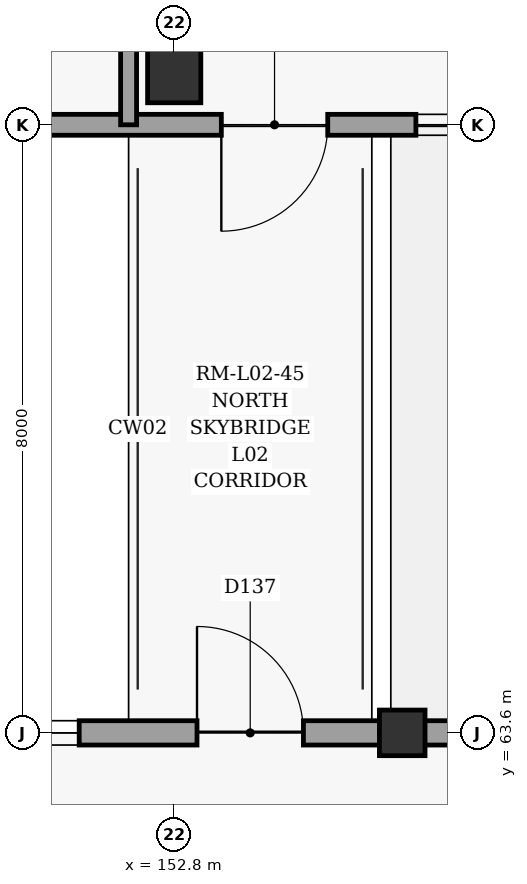
"""IFC4 building model, lengths in metres.
Left out: names, types, materials, properties, quantities, classifications, styles, units other than length and angle.
Written with IfcOpenShell. Run it as: python <this file> out.ifc"""

import sys

from ifc_helpers import new_model, si_unit, direction, frame, frame_2d, origin, origin_2d, place, context, subcontext, project, spatial, rectangle, extrude, element, fill, save


model = new_model("IFC4")
c1 = context("Model", 3, precision=1e-05, world=origin(), true_north=direction((0.0, 1.0)))
c2 = subcontext(c1, "Body", "Model", "MODEL_VIEW")
j1 = project(units=[si_unit("LENGTHUNIT", "METRE"), si_unit("PLANEANGLEUNIT", "RADIAN")], contexts=[c1])
p1 = place(None, origin())
s1 = spatial("IfcSite", under=j1, at=p1, CompositionType="ELEMENT")
p2 = place(p1, origin())
s2 = spatial("IfcBuilding", under=s1, at=p2, CompositionType="ELEMENT")
p3 = place(p2, frame((0.0, 0.0, 10.2)))
s3 = spatial("IfcBuildingStorey", under=s2, at=p3, CompositionType="ELEMENT", Elevation=10.2)
p4 = place(p3, frame((155.8, 63.6, 0.0), z_axis=(0.0, 0.0, 1.0), x_axis=(1.0, 0.0, 0.0)))
e1 = element("IfcColumn", 1, at=p4, inside=s3, PredefinedType="COLUMN", context=c2, shape_type="SweptSolid", body=[
    extrude(rectangle(XDim=0.6, YDim=0.6, at=origin_2d()), origin(), (0.0, 0.0, 1.0), 5.4),
])
p5 = place(p3, frame((152.8, 72.24, 0.0), z_axis=(0.0, 0.0, 1.0), x_axis=(1.0, 0.0, 0.0)))
e2 = element("IfcColumn", 2, at=p5, inside=s3, PredefinedType="COLUMN", context=c2, shape_type="SweptSolid", body=[
    extrude(rectangle(XDim=0.7, YDim=0.7, at=origin_2d()), origin(), (0.0, 0.0, 1.0), 5.4),
])
p6 = place(p3, frame((149.2, 63.6, 0.0), z_axis=(0.0, 0.0, 1.0), x_axis=(1.0, 0.0, 0.0)))
e3 = element("IfcWall", 3, at=p6, inside=s3, PredefinedType="SOLIDWALL", context=c2, shape_type="SweptSolid", body=[
    extrude(rectangle(XDim=22.8, YDim=0.32, at=frame_2d((11.4, 0.0))), origin(), (0.0, 0.0, 1.0), 4.3),
])
p7 = place(p6, frame((0.75, 0.0, 0.9)))
e4 = element("IfcOpeningElement", 4, at=p7, cuts=e3, PredefinedType="OPENING", context=c2, shape_type="SweptSolid", body=[
    extrude(rectangle(XDim=1.6, YDim=1.65, at=frame_2d((0.8, 0.825))), frame((0.0, 0.17, 0.0), z_axis=(0.0, -1.0, 0.0), x_axis=(1.0, 0.0, 0.0)), (0.0, 0.0, 1.0), 0.34),
])
p8 = place(p6, frame((8.6, 0.0, 0.9)))
e5 = element("IfcOpeningElement", 5, at=p8, cuts=e3, PredefinedType="OPENING", context=c2, shape_type="SweptSolid", body=[
    extrude(rectangle(XDim=2.8, YDim=2.4, at=frame_2d((1.4, 1.2))), frame((0.0, 0.17, 0.0), z_axis=(0.0, -1.0, 0.0), x_axis=(1.0, 0.0, 0.0)), (0.0, 0.0, 1.0), 0.34),
])
p9 = place(p6, frame((3.9, 0.0, 0.0)))
e6 = element("IfcOpeningElement", 6, at=p9, cuts=e3, PredefinedType="OPENING", context=c2, shape_type="SweptSolid", body=[
    extrude(rectangle(XDim=1.4, YDim=2.25, at=frame_2d((0.7, 1.125))), frame((0.0, 0.17, 0.0), z_axis=(0.0, -1.0, 0.0), x_axis=(1.0, 0.0, 0.0)), (0.0, 0.0, 1.0), 0.34),
])
p10 = place(p3, frame((172.0, 71.6, 0.0), z_axis=(0.0, 0.0, 1.0), x_axis=(-1.0, 0.0, 0.0)))
e7 = element("IfcWall", 7, at=p10, inside=s3, PredefinedType="SOLIDWALL", context=c2, shape_type="SweptSolid", body=[
    extrude(rectangle(XDim=32.4, YDim=0.275, at=frame_2d((16.2, 0.0))), origin(), (0.0, 0.0, 1.0), 5.16),
])
p11 = place(p10, frame((7.96, 0.0, 0.8)))
e8 = element("IfcOpeningElement", 8, at=p11, cuts=e7, PredefinedType="OPENING", context=c2, shape_type="SweptSolid", body=[
    extrude(rectangle(XDim=2.2, YDim=2.25, at=frame_2d((1.1, 1.125))), frame((0.0, 0.147, 0.0), z_axis=(0.0, -1.0, 0.0), x_axis=(1.0, 0.0, 0.0)), (0.0, 0.0, 1.0), 0.295),
])
p12 = place(p10, frame((13.72, 0.0, 0.8)))
e9 = element("IfcOpeningElement", 9, at=p12, cuts=e7, PredefinedType="OPENING", context=c2, shape_type="SweptSolid", body=[
    extrude(rectangle(XDim=2.3, YDim=2.25, at=frame_2d((1.15, 1.125))), frame((0.0, 0.147, 0.0), z_axis=(0.0, -1.0, 0.0), x_axis=(1.0, 0.0, 0.0)), (0.0, 0.0, 1.0), 0.295),
])
p13 = place(p10, frame((20.93, 0.0, 0.8)))
e10 = element("IfcOpeningElement", 10, at=p13, cuts=e7, PredefinedType="OPENING", context=c2, shape_type="SweptSolid", body=[
    extrude(rectangle(XDim=2.4, YDim=2.3, at=frame_2d((1.2, 1.15))), frame((0.0, 0.147, 0.0), z_axis=(0.0, -1.0, 0.0), x_axis=(1.0, 0.0, 0.0)), (0.0, 0.0, 1.0), 0.295),
])
p14 = place(p10, frame((25.24, 0.0, 0.8)))
e11 = element("IfcOpeningElement", 11, at=p14, cuts=e7, PredefinedType="OPENING", context=c2, shape_type="SweptSolid", body=[
    extrude(rectangle(XDim=2.5, YDim=2.3, at=frame_2d((1.25, 1.15))), frame((0.0, 0.147, 0.0), z_axis=(0.0, -1.0, 0.0), x_axis=(1.0, 0.0, 0.0)), (0.0, 0.0, 1.0), 0.295),
])
p15 = place(p10, frame((17.18, 0.0, 0.0)))
e12 = element("IfcOpeningElement", 12, at=p15, cuts=e7, PredefinedType="OPENING", context=c2, shape_type="SweptSolid", body=[
    extrude(rectangle(XDim=1.4, YDim=2.25, at=frame_2d((0.7, 1.125))), frame((0.0, 0.147, 0.0), z_axis=(0.0, -1.0, 0.0), x_axis=(1.0, 0.0, 0.0)), (0.0, 0.0, 1.0), 0.295),
])
p16 = place(p3, frame((152.2, 71.6, 0.0), z_axis=(0.0, 0.0, 1.0), x_axis=(0.0, 1.0, 0.0)))
e13 = element("IfcWall", 13, at=p16, inside=s3, PredefinedType="PARTITIONING", context=c2, shape_type="SweptSolid", body=[
    extrude(rectangle(XDim=3.0, YDim=0.21, at=frame_2d((1.5, 0.0))), origin(), (0.0, 0.0, 1.0), 5.16),
])
p17 = place(p7, origin())
e14 = element("IfcWindow", 14, at=p17, inside=s3, PartitioningType="SINGLE_PANEL", PredefinedType="WINDOW", context=c2, shape_type="SweptSolid", body=[
    extrude(rectangle(XDim=1.6, YDim=1.65, at=frame_2d((0.8, 0.825))), frame((0.0, 0.03, 0.0), z_axis=(0.0, -1.0, 0.0), x_axis=(1.0, 0.0, 0.0)), (0.0, 0.0, 1.0), 0.06),
])
fill(e4, e14)
p18 = place(p12, origin())
e15 = element("IfcWindow", 15, at=p18, inside=s3, PartitioningType="SINGLE_PANEL", PredefinedType="WINDOW", context=c2, shape_type="SweptSolid", body=[
    extrude(rectangle(XDim=2.3, YDim=2.25, at=frame_2d((1.15, 1.125))), frame((0.0, 0.03, 0.0), z_axis=(0.0, -1.0, 0.0), x_axis=(1.0, 0.0, 0.0)), (0.0, 0.0, 1.0), 0.06),
])
fill(e9, e15)
p19 = place(p9, origin())
e16 = element("IfcDoor", 16, at=p19, inside=s3, OperationType="SINGLE_SWING_LEFT", PredefinedType="DOOR", context=c2, shape_type="SweptSolid", body=[
    extrude(rectangle(XDim=1.4, YDim=2.25, at=frame_2d((0.7, 1.125))), frame((0.0, 0.025, 0.0), z_axis=(0.0, -1.0, 0.0), x_axis=(1.0, 0.0, 0.0)), (0.0, 0.0, 1.0), 0.05),
])
fill(e6, e16)
p20 = place(p15, origin())
e17 = element("IfcDoor", 17, at=p20, inside=s3, OperationType="SINGLE_SWING_RIGHT", PredefinedType="DOOR", context=c2, shape_type="SweptSolid", body=[
    extrude(rectangle(XDim=1.4, YDim=2.25, at=frame_2d((0.7, 1.125))), frame((0.0, 0.025, 0.0), z_axis=(0.0, -1.0, 0.0), x_axis=(1.0, 0.0, 0.0)), (0.0, 0.0, 1.0), 0.05),
])
fill(e12, e17)
save(model, sys.argv[1])
